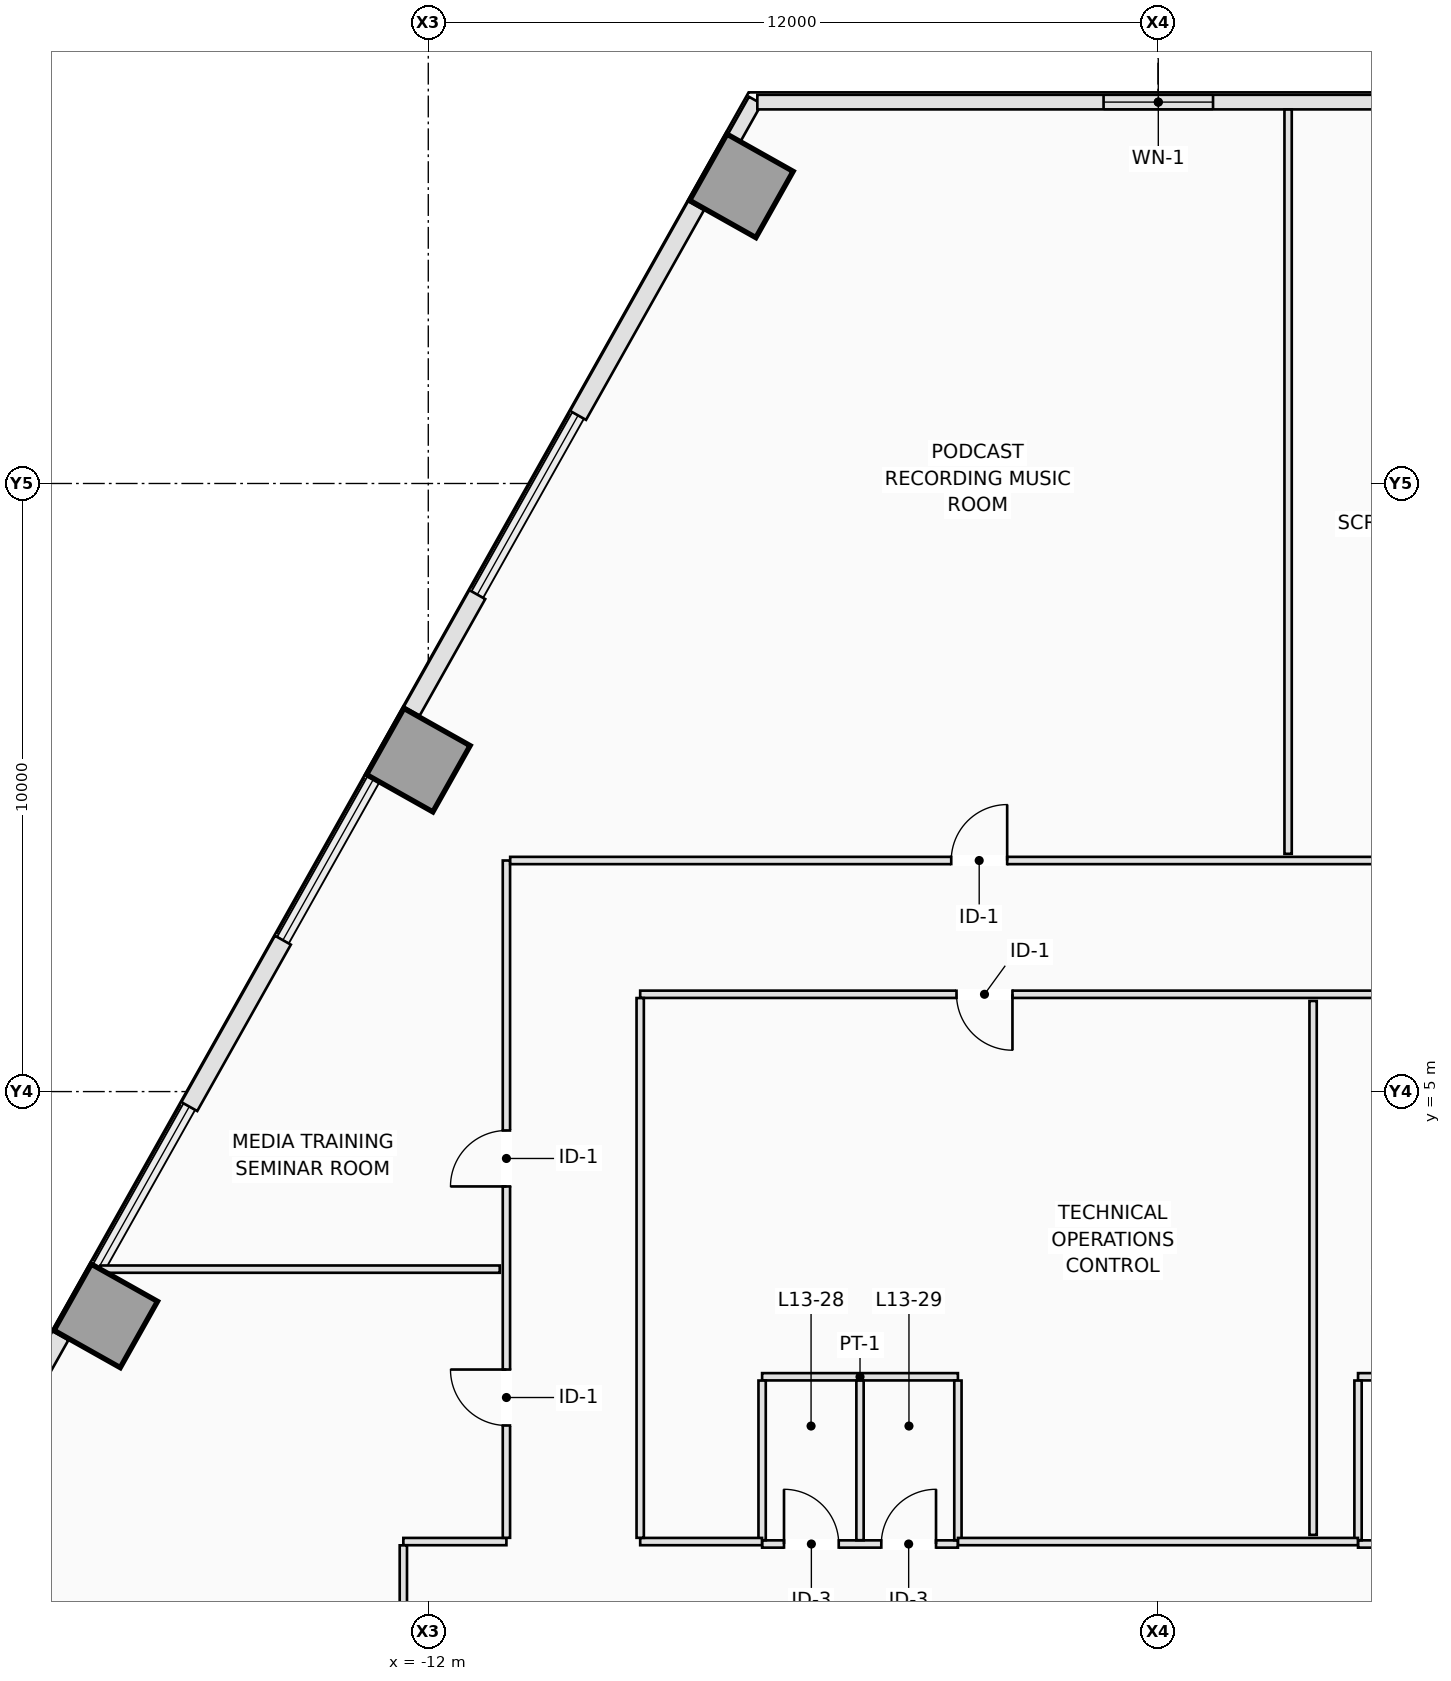
"""IFC4 building model, lengths in metres.
Left out: names, types, materials, properties, quantities, classifications, styles, units other than length and angle.
Written with IfcOpenShell. Run it as: python <this file> out.ifc"""

import sys

from ifc_helpers import new_model, si_unit, direction, frame, frame_2d, origin, origin_2d, place, context, subcontext, project, spatial, rectangle, extrude, element, fill, save


model = new_model("IFC4")
c1 = context("Model", 3, precision=1e-05, world=origin(), true_north=direction((0.0, 1.0)))
c2 = subcontext(c1, "Body", "Model", "MODEL_VIEW")
j1 = project(units=[si_unit("LENGTHUNIT", "METRE"), si_unit("PLANEANGLEUNIT", "RADIAN")], contexts=[c1])
p1 = place(None, origin())
s1 = spatial("IfcSite", under=j1, at=p1, CompositionType="ELEMENT")
p2 = place(p1, origin())
s2 = spatial("IfcBuilding", under=s1, at=p2, CompositionType="ELEMENT")
p3 = place(p2, frame((0.0, 0.0, 52.1)))
s3 = spatial("IfcBuildingStorey", under=s2, at=p3, CompositionType="ELEMENT", Elevation=52.1)
for number, where, z_axis, x_axis in (
    (1, (-6.851, 19.895, 0.0), (0.0, 0.0, 1.0), (-0.872, 0.49, 0.0)),
    (2, (-12.163, 10.451, 0.0), (0.0, 0.0, 1.0), (-0.872, 0.49, 0.0)),
    (3, (-17.304, 1.312, 0.0), (0.0, 0.0, 1.0), (-0.872, 0.49, 0.0)),
):
    element("IfcColumn", number, at=place(p3, frame(where, z_axis=z_axis, x_axis=x_axis)), inside=s3, PredefinedType="COLUMN", context=c2, shape_type="SweptSolid", body=[
        extrude(rectangle(XDim=1.25, YDim=1.25, at=origin_2d()), origin(), (0.0, 0.0, 1.0), 3.5),
    ])
p4 = place(p3, frame((-6.969, 20.684, 0.0), z_axis=(0.0, 0.0, 1.0), x_axis=(0.490261239633, 0.871575537125, 0.0)))
e4 = element("IfcWall", 4, at=p4, inside=s3, PredefinedType="STANDARD", context=c2, shape_type="SweptSolid", body=[
    extrude(rectangle(XDim=0.708, YDim=0.24, at=frame_2d((0.354, 0.0))), origin(), (0.0, 0.0, 1.0), 3.25),
])
p5 = place(p3, frame((-19.127, -0.93, 0.0), z_axis=(0.0, 0.0, 1.0), x_axis=(0.490277063651, 0.871566635925, 0.0)))
e5 = element("IfcWall", 5, at=p5, inside=s3, PredefinedType="STANDARD", context=c2, shape_type="SweptSolid", body=[
    extrude(rectangle(XDim=2.198, YDim=0.3, at=frame_2d((1.099, 0.0))), origin(), (0.0, 0.0, 1.0), 3.25),
])
p6 = place(p3, frame((-12.271, 11.258, 0.0), z_axis=(0.0, 0.0, 1.0), x_axis=(0.490324540864, 0.871539927156, 0.0)))
e6 = element("IfcWall", 6, at=p6, inside=s3, PredefinedType="STANDARD", context=c2, shape_type="SweptSolid", body=[
    extrude(rectangle(XDim=2.197, YDim=0.3, at=frame_2d((1.099, 0.0))), origin(), (0.0, 0.0, 1.0), 3.25),
])
p7 = place(p3, frame((-9.537, 16.12, 0.0), z_axis=(0.0, 0.0, 1.0), x_axis=(0.490240735008, 0.871587070659, 0.0)))
e7 = element("IfcWall", 7, at=p7, inside=s3, PredefinedType="STANDARD", context=c2, shape_type="SweptSolid", body=[
    extrude(rectangle(XDim=3.957, YDim=0.3, at=frame_2d((1.979, 0.0))), origin(), (0.0, 0.0, 1.0), 3.25),
])
p8 = place(p3, frame((-15.93, 4.753, 0.0), z_axis=(0.0, 0.0, 1.0), x_axis=(0.490290775148, 0.871558922738, 0.0)))
e8 = element("IfcWall", 8, at=p8, inside=s3, PredefinedType="STANDARD", context=c2, shape_type="SweptSolid", body=[
    extrude(rectangle(XDim=3.14, YDim=0.3, at=frame_2d((1.57, 0.0))), origin(), (0.0, 0.0, 1.0), 3.25),
])
p9 = place(p3, frame((6.598, 21.272, 0.0), z_axis=(0.0, 0.0, 1.0), x_axis=(-1.0, 0.0, 0.0)))
e9 = element("IfcWall", 9, at=p9, inside=s3, PredefinedType="STANDARD", context=c2, shape_type="SweptSolid", body=[
    extrude(rectangle(XDim=13.187, YDim=0.24, at=frame_2d((6.593, 0.0))), origin(), (0.0, 0.0, 1.0), 3.25),
])
p10 = place(p9, frame((5.693, 0.0, 0.9)))
e10 = element("IfcOpeningElement", 10, at=p10, cuts=e9, PredefinedType="OPENING", context=c2, shape_type="SweptSolid", body=[
    extrude(rectangle(XDim=1.8, YDim=2.1, at=frame_2d((0.9, 1.05))), frame((0.0, 0.13, 0.0), z_axis=(0.0, -1.0, 0.0), x_axis=(1.0, 0.0, 0.0)), (0.0, 0.0, 1.0), 0.26),
])
p11 = place(p3, frame((-6.51, -2.44, 0.0), z_axis=(0.0, 0.0, 1.0), x_axis=(1.0, 0.0, 0.0)))
e11 = element("IfcWall", 11, at=p11, inside=s3, PredefinedType="PARTITIONING", context=c2, shape_type="SweptSolid", body=[
    extrude(rectangle(XDim=3.22, YDim=0.12, at=frame_2d((1.61, 0.0))), origin(), (0.0, 0.0, 1.0), 3.25),
])
p12 = place(p11, frame((0.36, 0.0, 0.0)))
e12 = element("IfcOpeningElement", 12, at=p12, cuts=e11, PredefinedType="OPENING", context=c2, shape_type="SweptSolid", body=[
    extrude(rectangle(XDim=0.9, YDim=2.12, at=frame_2d((0.45, 1.06))), frame((0.0, 0.07, 0.0), z_axis=(0.0, -1.0, 0.0), x_axis=(1.0, 0.0, 0.0)), (0.0, 0.0, 1.0), 0.14),
])
p13 = place(p11, frame((1.96, 0.0, 0.0)))
e13 = element("IfcOpeningElement", 13, at=p13, cuts=e11, PredefinedType="OPENING", context=c2, shape_type="SweptSolid", body=[
    extrude(rectangle(XDim=0.9, YDim=2.12, at=frame_2d((0.45, 1.06))), frame((0.0, 0.07, 0.0), z_axis=(0.0, -1.0, 0.0), x_axis=(1.0, 0.0, 0.0)), (0.0, 0.0, 1.0), 0.14),
])
p14 = place(p3, frame((-6.51, 0.31, 0.0), z_axis=(0.0, 0.0, 1.0), x_axis=(1.0, 0.0, 0.0)))
e14 = element("IfcWall", 14, at=p14, inside=s3, PredefinedType="PARTITIONING", context=c2, shape_type="SweptSolid", body=[
    extrude(rectangle(XDim=3.22, YDim=0.12, at=frame_2d((1.61, 0.0))), origin(), (0.0, 0.0, 1.0), 2.844),
])
for number, where, z_axis, x_axis in (
    (15, (-6.51, -2.378, 0.0), (0.0, 0.0, 1.0), (0.0, 1.0, 0.0)),
    (16, (-4.9, -2.378, 0.0), (0.0, 0.0, 1.0), (0.0, 1.0, 0.0)),
    (17, (-3.29, -2.378, 0.0), (0.0, 0.0, 1.0), (0.0, 1.0, 0.0)),
):
    element("IfcWall", number, at=place(p3, frame(where, z_axis=z_axis, x_axis=x_axis)), inside=s3, PredefinedType="PARTITIONING", context=c2, shape_type="SweptSolid", body=[
        extrude(rectangle(XDim=2.626, YDim=0.12, at=frame_2d((1.313, 0.0))), origin(), (0.0, 0.0, 1.0), 3.25),
    ])
p15 = place(p3, frame((3.29, -2.44, 0.0), z_axis=(0.0, 0.0, 1.0), x_axis=(1.0, 0.0, 0.0)))
e18 = element("IfcWall", 18, at=p15, inside=s3, PredefinedType="PARTITIONING", context=c2, shape_type="SweptSolid", body=[
    extrude(rectangle(XDim=3.22, YDim=0.12, at=frame_2d((1.61, 0.0))), origin(), (0.0, 0.0, 1.0), 3.25),
])
p16 = place(p15, frame((0.36, 0.0, 0.0)))
e19 = element("IfcOpeningElement", 19, at=p16, cuts=e18, PredefinedType="OPENING", context=c2, shape_type="SweptSolid", body=[
    extrude(rectangle(XDim=0.9, YDim=2.12, at=frame_2d((0.45, 1.06))), frame((0.0, 0.07, 0.0), z_axis=(0.0, -1.0, 0.0), x_axis=(1.0, 0.0, 0.0)), (0.0, 0.0, 1.0), 0.14),
])
p17 = place(p15, frame((1.96, 0.0, 0.0)))
e20 = element("IfcOpeningElement", 20, at=p17, cuts=e18, PredefinedType="OPENING", context=c2, shape_type="SweptSolid", body=[
    extrude(rectangle(XDim=0.9, YDim=2.12, at=frame_2d((0.45, 1.06))), frame((0.0, 0.07, 0.0), z_axis=(0.0, -1.0, 0.0), x_axis=(1.0, 0.0, 0.0)), (0.0, 0.0, 1.0), 0.14),
])
p18 = place(p3, frame((3.29, 0.31, 0.0), z_axis=(0.0, 0.0, 1.0), x_axis=(1.0, 0.0, 0.0)))
e21 = element("IfcWall", 21, at=p18, inside=s3, PredefinedType="PARTITIONING", context=c2, shape_type="SweptSolid", body=[
    extrude(rectangle(XDim=3.22, YDim=0.12, at=frame_2d((1.61, 0.0))), origin(), (0.0, 0.0, 1.0), 2.844),
])
p19 = place(p3, frame((3.29, -2.378, 0.0), z_axis=(0.0, 0.0, 1.0), x_axis=(0.0, 1.0, 0.0)))
e22 = element("IfcWall", 22, at=p19, inside=s3, PredefinedType="PARTITIONING", context=c2, shape_type="SweptSolid", body=[
    extrude(rectangle(XDim=2.626, YDim=0.12, at=frame_2d((1.313, 0.0))), origin(), (0.0, 0.0, 1.0), 3.25),
])
p20 = place(p3, frame((-12.41, -2.4, 0.0), z_axis=(0.0, 0.0, 1.0), x_axis=(1.0, 0.0, 0.0)))
e23 = element("IfcWall", 23, at=p20, inside=s3, PredefinedType="PARTITIONING", context=c2, shape_type="SweptSolid", body=[
    extrude(rectangle(XDim=1.695, YDim=0.12, at=frame_2d((0.847, 0.0))), origin(), (0.0, 0.0, 1.0), 3.25),
])
p21 = place(p3, frame((-10.715, -2.338, 0.0), z_axis=(0.0, 0.0, 1.0), x_axis=(0.0, 1.0, 0.0)))
e24 = element("IfcWall", 24, at=p21, inside=s3, PredefinedType="PARTITIONING", context=c2, shape_type="SweptSolid", body=[
    extrude(rectangle(XDim=11.138, YDim=0.12, at=frame_2d((5.569, 0.0))), origin(), (0.0, 0.0, 1.0), 3.25),
])
p22 = place(p21, frame((5.778, 0.0, 0.0)))
e25 = element("IfcOpeningElement", 25, at=p22, cuts=e24, PredefinedType="OPENING", context=c2, shape_type="SweptSolid", body=[
    extrude(rectangle(XDim=0.92, YDim=2.12, at=frame_2d((0.46, 1.06))), frame((0.0, 0.07, 0.0), z_axis=(0.0, -1.0, 0.0), x_axis=(1.0, 0.0, 0.0)), (0.0, 0.0, 1.0), 0.14),
])
p23 = place(p21, frame((1.847, 0.0, 0.0)))
e26 = element("IfcOpeningElement", 26, at=p23, cuts=e24, PredefinedType="OPENING", context=c2, shape_type="SweptSolid", body=[
    extrude(rectangle(XDim=0.92, YDim=2.12, at=frame_2d((0.46, 1.06))), frame((0.0, 0.07, 0.0), z_axis=(0.0, -1.0, 0.0), x_axis=(1.0, 0.0, 0.0)), (0.0, 0.0, 1.0), 0.14),
])
p24 = place(p3, frame((-10.653, 8.8, 0.0), z_axis=(0.0, 0.0, 1.0), x_axis=(1.0, 0.0, 0.0)))
e27 = element("IfcWall", 27, at=p24, inside=s3, PredefinedType="PARTITIONING", context=c2, shape_type="SweptSolid", body=[
    extrude(rectangle(XDim=21.638, YDim=0.12, at=frame_2d((10.819, 0.0))), origin(), (0.0, 0.0, 1.0), 3.25),
])
p25 = place(p24, frame((14.753, 0.0, 0.0)))
e28 = element("IfcOpeningElement", 28, at=p25, cuts=e27, PredefinedType="OPENING", context=c2, shape_type="SweptSolid", body=[
    extrude(rectangle(XDim=0.92, YDim=2.12, at=frame_2d((0.46, 1.06))), frame((0.0, 0.07, 0.0), z_axis=(0.0, -1.0, 0.0), x_axis=(1.0, 0.0, 0.0)), (0.0, 0.0, 1.0), 0.14),
])
p26 = place(p24, frame((7.253, 0.0, 0.0)))
e29 = element("IfcOpeningElement", 29, at=p26, cuts=e27, PredefinedType="OPENING", context=c2, shape_type="SweptSolid", body=[
    extrude(rectangle(XDim=0.92, YDim=2.12, at=frame_2d((0.46, 1.06))), frame((0.0, 0.07, 0.0), z_axis=(0.0, -1.0, 0.0), x_axis=(1.0, 0.0, 0.0)), (0.0, 0.0, 1.0), 0.14),
])
p27 = place(p24, frame((19.046, 0.0, 0.0)))
e30 = element("IfcOpeningElement", 30, at=p27, cuts=e27, PredefinedType="OPENING", context=c2, shape_type="SweptSolid", body=[
    extrude(rectangle(XDim=0.92, YDim=2.12, at=frame_2d((0.46, 1.06))), frame((0.0, 0.07, 0.0), z_axis=(0.0, -1.0, 0.0), x_axis=(1.0, 0.0, 0.0)), (0.0, 0.0, 1.0), 0.14),
])
p28 = place(p3, frame((-12.41, -4.098, 0.0), z_axis=(0.0, 0.0, 1.0), x_axis=(0.0, 1.0, 0.0)))
e31 = element("IfcWall", 31, at=p28, inside=s3, PredefinedType="PARTITIONING", context=c2, shape_type="SweptSolid", body=[
    extrude(rectangle(XDim=1.636, YDim=0.12, at=frame_2d((0.818, 0.0))), origin(), (0.0, 0.0, 1.0), 3.25),
])
p29 = place(p3, frame((-8.515, -2.4, 0.0), z_axis=(0.0, 0.0, 1.0), x_axis=(1.0, 0.0, 0.0)))
e32 = element("IfcWall", 32, at=p29, inside=s3, PredefinedType="PARTITIONING", context=c2, shape_type="SweptSolid", body=[
    extrude(rectangle(XDim=2.003, YDim=0.12, at=frame_2d((1.001, 0.0))), origin(), (0.0, 0.0, 1.0), 3.25),
])
p30 = place(p3, frame((-3.288, -2.4, 0.0), z_axis=(0.0, 0.0, 1.0), x_axis=(1.0, 0.0, 0.0)))
e33 = element("IfcWall", 33, at=p30, inside=s3, PredefinedType="PARTITIONING", context=c2, shape_type="SweptSolid", body=[
    extrude(rectangle(XDim=6.576, YDim=0.12, at=frame_2d((3.288, 0.0))), origin(), (0.0, 0.0, 1.0), 3.25),
])
p31 = place(p3, frame((8.723, 6.6, 0.0), z_axis=(0.0, 0.0, 1.0), x_axis=(-1.0, 0.0, 0.0)))
e34 = element("IfcWall", 34, at=p31, inside=s3, PredefinedType="PARTITIONING", context=c2, shape_type="SweptSolid", body=[
    extrude(rectangle(XDim=17.238, YDim=0.12, at=frame_2d((8.619, 0.0))), origin(), (0.0, 0.0, 1.0), 3.25),
])
p32 = place(p31, frame((11.116, 0.0, 0.0)))
e35 = element("IfcOpeningElement", 35, at=p32, cuts=e34, PredefinedType="OPENING", context=c2, shape_type="SweptSolid", body=[
    extrude(rectangle(XDim=0.92, YDim=2.12, at=frame_2d((0.46, 1.06))), frame((0.0, 0.07, 0.0), z_axis=(0.0, -1.0, 0.0), x_axis=(1.0, 0.0, 0.0)), (0.0, 0.0, 1.0), 0.14),
])
p33 = place(p3, frame((-8.515, 6.538, 0.0), z_axis=(0.0, 0.0, 1.0), x_axis=(0.0, -1.0, 0.0)))
e36 = element("IfcWall", 36, at=p33, inside=s3, PredefinedType="PARTITIONING", context=c2, shape_type="SweptSolid", body=[
    extrude(rectangle(XDim=8.876, YDim=0.12, at=frame_2d((4.438, 0.0))), origin(), (0.0, 0.0, 1.0), 3.25),
])
p34 = place(p3, frame((2.14, 8.91, 0.0), z_axis=(0.0, 0.0, 1.0), x_axis=(0.0, 1.0, 0.0)))
e37 = element("IfcWall", 37, at=p34, inside=s3, PredefinedType="PARTITIONING", context=c2, shape_type="SweptSolid", body=[
    extrude(rectangle(XDim=12.24, YDim=0.12, at=frame_2d((6.12, 0.0))), origin(), (0.0, 0.0, 1.0), 3.25),
])
p35 = place(p3, frame((-10.825, 2.08, 0.0), z_axis=(0.0, 0.0, 1.0), x_axis=(-1.0, 0.0, 0.0)))
e38 = element("IfcWall", 38, at=p35, inside=s3, PredefinedType="PARTITIONING", context=c2, shape_type="SweptSolid", body=[
    extrude(rectangle(XDim=6.566, YDim=0.12, at=frame_2d((3.283, 0.0))), origin(), (0.0, 0.0, 1.0), 3.25),
])
p36 = place(p3, frame((2.551, -2.29, 0.0), z_axis=(0.0, 0.0, 1.0), x_axis=(0.0, 1.0, 0.0)))
e39 = element("IfcWall", 39, at=p36, inside=s3, PredefinedType="PARTITIONING", context=c2, shape_type="SweptSolid", body=[
    extrude(rectangle(XDim=8.78, YDim=0.12, at=frame_2d((4.39, 0.0))), origin(), (0.0, 0.0, 1.0), 3.25),
])
p37 = place(p10, origin())
e40 = element("IfcWindow", 40, at=p37, inside=s3, PartitioningType="SINGLE_PANEL", PredefinedType="WINDOW", context=c2, shape_type="SweptSolid", body=[
    extrude(rectangle(XDim=1.8, YDim=2.1, at=frame_2d((0.9, 1.05))), frame((0.0, 0.03, 0.0), z_axis=(0.0, -1.0, 0.0), x_axis=(1.0, 0.0, 0.0)), (0.0, 0.0, 1.0), 0.06),
])
fill(e10, e40)
p38 = place(p12, origin())
e41 = element("IfcDoor", 41, at=p38, inside=s3, OperationType="SINGLE_SWING_LEFT", PredefinedType="DOOR", context=c2, shape_type="SweptSolid", body=[
    extrude(rectangle(XDim=0.9, YDim=2.12, at=frame_2d((0.45, 1.06))), frame((0.0, 0.025, 0.0), z_axis=(0.0, -1.0, 0.0), x_axis=(1.0, 0.0, 0.0)), (0.0, 0.0, 1.0), 0.05),
])
fill(e12, e41)
p39 = place(p13, origin())
e42 = element("IfcDoor", 42, at=p39, inside=s3, OperationType="SINGLE_SWING_RIGHT", PredefinedType="DOOR", context=c2, shape_type="SweptSolid", body=[
    extrude(rectangle(XDim=0.9, YDim=2.12, at=frame_2d((0.45, 1.06))), frame((0.0, 0.025, 0.0), z_axis=(0.0, -1.0, 0.0), x_axis=(1.0, 0.0, 0.0)), (0.0, 0.0, 1.0), 0.05),
])
fill(e13, e42)
p40 = place(p26, origin())
e43 = element("IfcDoor", 43, at=p40, inside=s3, OperationType="SINGLE_SWING_RIGHT", PredefinedType="DOOR", context=c2, shape_type="SweptSolid", body=[
    extrude(rectangle(XDim=0.92, YDim=2.12, at=frame_2d((0.46, 1.06))), frame((0.0, 0.025, 0.0), z_axis=(0.0, -1.0, 0.0), x_axis=(1.0, 0.0, 0.0)), (0.0, 0.0, 1.0), 0.05),
])
fill(e29, e43)
p41 = place(p22, origin())
e44 = element("IfcDoor", 44, at=p41, inside=s3, OperationType="SINGLE_SWING_LEFT", PredefinedType="DOOR", context=c2, shape_type="SweptSolid", body=[
    extrude(rectangle(XDim=0.92, YDim=2.12, at=frame_2d((0.46, 1.06))), frame((0.0, 0.025, 0.0), z_axis=(0.0, -1.0, 0.0), x_axis=(1.0, 0.0, 0.0)), (0.0, 0.0, 1.0), 0.05),
])
fill(e25, e44)
p42 = place(p32, origin())
e45 = element("IfcDoor", 45, at=p42, inside=s3, OperationType="SINGLE_SWING_LEFT", PredefinedType="DOOR", context=c2, shape_type="SweptSolid", body=[
    extrude(rectangle(XDim=0.92, YDim=2.12, at=frame_2d((0.46, 1.06))), frame((0.0, 0.025, 0.0), z_axis=(0.0, -1.0, 0.0), x_axis=(1.0, 0.0, 0.0)), (0.0, 0.0, 1.0), 0.05),
])
fill(e35, e45)
p43 = place(p23, origin())
e46 = element("IfcDoor", 46, at=p43, inside=s3, OperationType="SINGLE_SWING_RIGHT", PredefinedType="DOOR", context=c2, shape_type="SweptSolid", body=[
    extrude(rectangle(XDim=0.92, YDim=2.12, at=frame_2d((0.46, 1.06))), frame((0.0, 0.025, 0.0), z_axis=(0.0, -1.0, 0.0), x_axis=(1.0, 0.0, 0.0)), (0.0, 0.0, 1.0), 0.05),
])
fill(e26, e46)
save(model, sys.argv[1])
